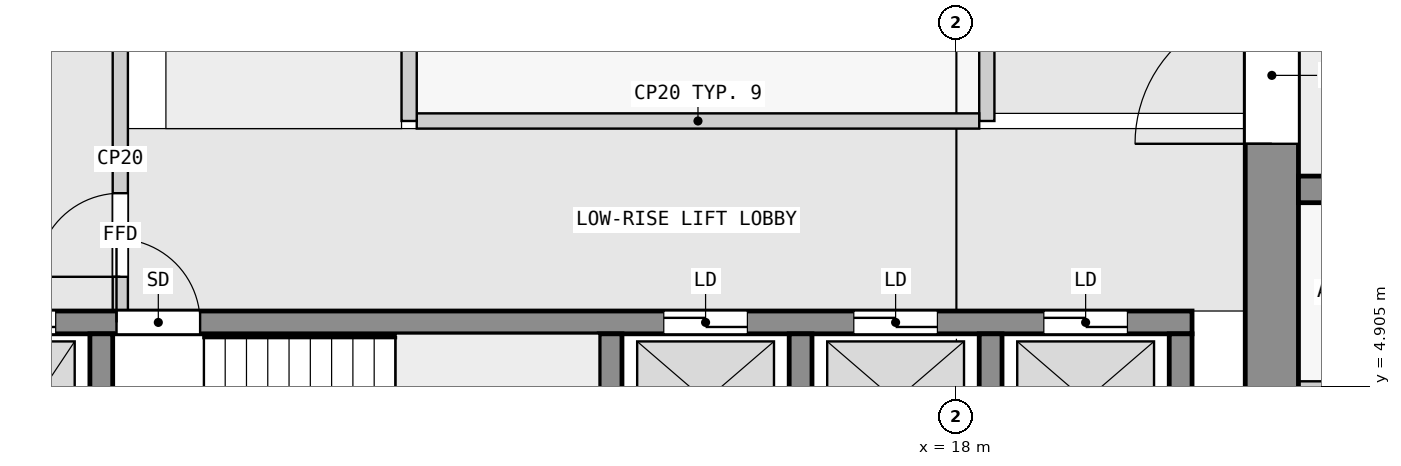
"""IFC4 building model, lengths in metres.
Left out: names, types, materials, properties, quantities, classifications, styles, units other than length and angle.
Written with IfcOpenShell. Run it as: python <this file> out.ifc"""

import sys

from ifc_helpers import new_model, si_unit, direction, frame, frame_2d, origin, place, context, subcontext, project, spatial, rectangle, extrude, element, fill, save


model = new_model("IFC4")
c1 = context("Model", 3, precision=1e-05, world=origin(), true_north=direction((0.0, 1.0)))
c2 = subcontext(c1, "Body", "Model", "MODEL_VIEW")
j1 = project(units=[si_unit("LENGTHUNIT", "METRE"), si_unit("PLANEANGLEUNIT", "RADIAN")], contexts=[c1])
p1 = place(None, origin())
s1 = spatial("IfcSite", under=j1, at=p1, CompositionType="ELEMENT")
p2 = place(p1, origin())
s2 = spatial("IfcBuilding", under=s1, at=p2, CompositionType="ELEMENT")
p3 = place(p2, frame((0.0, 0.0, 68.8)))
s3 = spatial("IfcBuildingStorey", under=s2, at=p3, CompositionType="ELEMENT", Elevation=68.8)
p4 = place(p3, frame((22.15, 2.5, 0.0), z_axis=(0.0, 0.0, 1.0), x_axis=(0.0, 1.0, 0.0)))
e1 = element("IfcWall", 1, at=p4, inside=s3, PredefinedType="SHEAR", context=c2, shape_type="SweptSolid", body=[
    extrude(rectangle(XDim=14.8, YDim=0.7, at=frame_2d((7.4, 0.0))), origin(), (0.0, 0.0, 1.0), 3.2),
])
p5 = place(p4, frame((5.6, 0.0, 0.0)))
e2 = element("IfcOpeningElement", 2, at=p5, cuts=e1, PredefinedType="OPENING", context=c2, shape_type="SweptSolid", body=[
    extrude(rectangle(XDim=1.8, YDim=2.1, at=frame_2d((0.9, 1.05))), frame((0.0, 0.36, 0.0), z_axis=(0.0, -1.0, 0.0), x_axis=(1.0, 0.0, 0.0)), (0.0, 0.0, 1.0), 0.72),
])
for number, where, z_axis, x_axis in (
    (3, (6.75, 2.8, 0.0), (0.0, 0.0, 1.0), (0.0, 1.0, 0.0)),
    (4, (13.45, 2.8, 0.0), (0.0, 0.0, 1.0), (0.0, 1.0, 0.0)),
    (5, (15.95, 2.8, 0.0), (0.0, 0.0, 1.0), (0.0, 1.0, 0.0)),
    (6, (18.45, 2.8, 0.0), (0.0, 0.0, 1.0), (0.0, 1.0, 0.0)),
    (7, (20.95, 2.8, 0.0), (0.0, 0.0, 1.0), (0.0, 1.0, 0.0)),
):
    element("IfcWall", number, at=place(p3, frame(where, z_axis=z_axis, x_axis=x_axis)), inside=s3, PredefinedType="SHEAR", context=c2, shape_type="SweptSolid", body=[
        extrude(rectangle(XDim=2.8, YDim=0.3, at=frame_2d((1.4, 0.0))), origin(), (0.0, 0.0, 1.0), 3.2),
    ])
p6 = place(p3, frame((2.3, 5.75, 0.0), z_axis=(0.0, 0.0, 1.0), x_axis=(1.0, 0.0, 0.0)))
e8 = element("IfcWall", 8, at=p6, inside=s3, PredefinedType="SHEAR", context=c2, shape_type="SweptSolid", body=[
    extrude(rectangle(XDim=18.8, YDim=0.3, at=frame_2d((9.4, 0.0))), origin(), (0.0, 0.0, 1.0), 3.2),
])
p7 = place(p6, frame((4.65, 0.0, 0.0)))
e9 = element("IfcOpeningElement", 9, at=p7, cuts=e8, PredefinedType="OPENING", context=c2, shape_type="SweptSolid", body=[
    extrude(rectangle(XDim=1.1, YDim=2.1, at=frame_2d((0.55, 1.05))), frame((0.0, 0.16, 0.0), z_axis=(0.0, -1.0, 0.0), x_axis=(1.0, 0.0, 0.0)), (0.0, 0.0, 1.0), 0.32),
])
p8 = place(p6, frame((0.45, 0.0, 0.0)))
e10 = element("IfcOpeningElement", 10, at=p8, cuts=e8, PredefinedType="OPENING", context=c2, shape_type="SweptSolid", body=[
    extrude(rectangle(XDim=1.1, YDim=2.1, at=frame_2d((0.55, 1.05))), frame((0.0, 0.16, 0.0), z_axis=(0.0, -1.0, 0.0), x_axis=(1.0, 0.0, 0.0)), (0.0, 0.0, 1.0), 0.32),
])
p9 = place(p6, frame((2.75, 0.0, 0.0)))
e11 = element("IfcOpeningElement", 11, at=p9, cuts=e8, PredefinedType="OPENING", context=c2, shape_type="SweptSolid", body=[
    extrude(rectangle(XDim=1.1, YDim=2.1, at=frame_2d((0.55, 1.05))), frame((0.0, 0.16, 0.0), z_axis=(0.0, -1.0, 0.0), x_axis=(1.0, 0.0, 0.0)), (0.0, 0.0, 1.0), 0.32),
])
p10 = place(p6, frame((11.85, 0.0, 0.0)))
e12 = element("IfcOpeningElement", 12, at=p10, cuts=e8, PredefinedType="OPENING", context=c2, shape_type="SweptSolid", body=[
    extrude(rectangle(XDim=1.1, YDim=2.1, at=frame_2d((0.55, 1.05))), frame((0.0, 0.16, 0.0), z_axis=(0.0, -1.0, 0.0), x_axis=(1.0, 0.0, 0.0)), (0.0, 0.0, 1.0), 0.32),
])
p11 = place(p6, frame((14.35, 0.0, 0.0)))
e13 = element("IfcOpeningElement", 13, at=p11, cuts=e8, PredefinedType="OPENING", context=c2, shape_type="SweptSolid", body=[
    extrude(rectangle(XDim=1.1, YDim=2.1, at=frame_2d((0.55, 1.05))), frame((0.0, 0.16, 0.0), z_axis=(0.0, -1.0, 0.0), x_axis=(1.0, 0.0, 0.0)), (0.0, 0.0, 1.0), 0.32),
])
p12 = place(p6, frame((16.85, 0.0, 0.0)))
e14 = element("IfcOpeningElement", 14, at=p12, cuts=e8, PredefinedType="OPENING", context=c2, shape_type="SweptSolid", body=[
    extrude(rectangle(XDim=1.1, YDim=2.1, at=frame_2d((0.55, 1.05))), frame((0.0, 0.16, 0.0), z_axis=(0.0, -1.0, 0.0), x_axis=(1.0, 0.0, 0.0)), (0.0, 0.0, 1.0), 0.32),
])
p13 = place(p3, frame((22.5, 7.5, 0.0), z_axis=(0.0, 0.0, 1.0), x_axis=(1.0, 0.0, 0.0)))
e15 = element("IfcWall", 15, at=p13, inside=s3, PredefinedType="SHEAR", context=c2, shape_type="SweptSolid", body=[
    extrude(rectangle(XDim=22.5, YDim=0.35, at=frame_2d((11.25, 0.0))), origin(), (0.0, 0.0, 1.0), 3.2),
])
p14 = place(p13, frame((9.55, 0.0, 0.0)))
e16 = element("IfcOpeningElement", 16, at=p14, cuts=e15, PredefinedType="OPENING", context=c2, shape_type="SweptSolid", body=[
    extrude(rectangle(XDim=1.0, YDim=2.1, at=frame_2d((0.5, 1.05))), frame((0.0, 0.185, 0.0), z_axis=(0.0, -1.0, 0.0), x_axis=(1.0, 0.0, 0.0)), (0.0, 0.0, 1.0), 0.37),
])
p15 = place(p13, frame((18.75, 0.0, 0.0)))
e17 = element("IfcOpeningElement", 17, at=p15, cuts=e15, PredefinedType="OPENING", context=c2, shape_type="SweptSolid", body=[
    extrude(rectangle(XDim=0.9, YDim=2.1, at=frame_2d((0.45, 1.05))), frame((0.0, 0.185, 0.0), z_axis=(0.0, -1.0, 0.0), x_axis=(1.0, 0.0, 0.0)), (0.0, 0.0, 1.0), 0.37),
])
p16 = place(p13, frame((20.95, 0.0, 0.0)))
e18 = element("IfcOpeningElement", 18, at=p16, cuts=e15, PredefinedType="OPENING", context=c2, shape_type="SweptSolid", body=[
    extrude(rectangle(XDim=1.0, YDim=2.1, at=frame_2d((0.5, 1.05))), frame((0.0, 0.185, 0.0), z_axis=(0.0, -1.0, 0.0), x_axis=(1.0, 0.0, 0.0)), (0.0, 0.0, 1.0), 0.37),
])
p17 = place(p3, frame((7.0, 5.9, 0.0), z_axis=(0.0, 0.0, 1.0), x_axis=(0.0, 1.0, 0.0)))
e19 = element("IfcWall", 19, at=p17, inside=s3, PredefinedType="PARTITIONING", context=c2, shape_type="SweptSolid", body=[
    extrude(rectangle(XDim=4.0, YDim=0.2, at=frame_2d((2.0, 0.0))), origin(), (0.0, 0.0, 1.0), 3.2),
])
p18 = place(p17, frame((0.45, 0.0, 0.0)))
e20 = element("IfcOpeningElement", 20, at=p18, cuts=e19, PredefinedType="OPENING", context=c2, shape_type="SweptSolid", body=[
    extrude(rectangle(XDim=1.1, YDim=2.1, at=frame_2d((0.55, 1.05))), frame((0.0, 0.11, 0.0), z_axis=(0.0, -1.0, 0.0), x_axis=(1.0, 0.0, 0.0)), (0.0, 0.0, 1.0), 0.22),
])
p19 = place(p3, frame((10.8, 8.4, 0.0), z_axis=(0.0, 0.0, 1.0), x_axis=(0.0, 1.0, 0.0)))
e21 = element("IfcWall", 21, at=p19, inside=s3, PredefinedType="PARTITIONING", context=c2, shape_type="SweptSolid", body=[
    extrude(rectangle(XDim=6.2, YDim=0.2, at=frame_2d((3.1, 0.0))), origin(), (0.0, 0.0, 1.0), 3.2),
])
p20 = place(p3, frame((10.9, 8.4, 0.0), z_axis=(0.0, 0.0, 1.0), x_axis=(1.0, 0.0, 0.0)))
e22 = element("IfcWall", 22, at=p20, inside=s3, PredefinedType="PARTITIONING", context=c2, shape_type="SweptSolid", body=[
    extrude(rectangle(XDim=7.4, YDim=0.2, at=frame_2d((3.7, 0.0))), origin(), (0.0, 0.0, 1.0), 3.2),
])
p21 = place(p3, frame((18.4, 8.4, 0.0), z_axis=(0.0, 0.0, 1.0), x_axis=(0.0, 1.0, 0.0)))
e23 = element("IfcWall", 23, at=p21, inside=s3, PredefinedType="PARTITIONING", context=c2, shape_type="SweptSolid", body=[
    extrude(rectangle(XDim=6.2, YDim=0.2, at=frame_2d((3.1, 0.0))), origin(), (0.0, 0.0, 1.0), 3.2),
])
p22 = place(p21, frame((3.15, 0.0, 0.0)))
e24 = element("IfcOpeningElement", 24, at=p22, cuts=e23, PredefinedType="OPENING", context=c2, shape_type="SweptSolid", body=[
    extrude(rectangle(XDim=0.9, YDim=2.1, at=frame_2d((0.45, 1.05))), frame((0.0, 0.11, 0.0), z_axis=(0.0, -1.0, 0.0), x_axis=(1.0, 0.0, 0.0)), (0.0, 0.0, 1.0), 0.22),
])
p23 = place(p3, frame((22.5, 4.925, 0.0), z_axis=(0.0, 0.0, 1.0), x_axis=(1.0, 0.0, 0.0)))
e25 = element("IfcWall", 25, at=p23, inside=s3, PredefinedType="PARTITIONING", context=c2, shape_type="SweptSolid", body=[
    extrude(rectangle(XDim=3.9, YDim=0.1, at=frame_2d((1.95, 0.0))), origin(), (0.0, 0.0, 1.0), 3.2),
])
p24 = place(p18, origin())
e26 = element("IfcDoor", 26, at=p24, inside=s3, OperationType="SINGLE_SWING_LEFT", PredefinedType="DOOR", context=c2, shape_type="SweptSolid", body=[
    extrude(rectangle(XDim=1.1, YDim=2.1, at=frame_2d((0.55, 1.05))), frame((0.0, 0.025, 0.0), z_axis=(0.0, -1.0, 0.0), x_axis=(1.0, 0.0, 0.0)), (0.0, 0.0, 1.0), 0.05),
])
fill(e20, e26)
p25 = place(p7, origin())
e27 = element("IfcDoor", 27, at=p25, inside=s3, OperationType="SINGLE_SWING_LEFT", PredefinedType="DOOR", context=c2, shape_type="SweptSolid", body=[
    extrude(rectangle(XDim=1.1, YDim=2.1, at=frame_2d((0.55, 1.05))), frame((0.0, 0.025, 0.0), z_axis=(0.0, -1.0, 0.0), x_axis=(1.0, 0.0, 0.0)), (0.0, 0.0, 1.0), 0.05),
])
fill(e9, e27)
p26 = place(p9, origin())
e28 = element("IfcDoor", 28, at=p26, inside=s3, OperationType="DOUBLE_DOOR_SLIDING", PredefinedType="DOOR", context=c2, shape_type="SweptSolid", body=[
    extrude(rectangle(XDim=1.1, YDim=2.1, at=frame_2d((0.55, 1.05))), frame((0.0, 0.025, 0.0), z_axis=(0.0, -1.0, 0.0), x_axis=(1.0, 0.0, 0.0)), (0.0, 0.0, 1.0), 0.05),
])
fill(e11, e28)
p27 = place(p10, origin())
e29 = element("IfcDoor", 29, at=p27, inside=s3, OperationType="DOUBLE_DOOR_SLIDING", PredefinedType="DOOR", context=c2, shape_type="SweptSolid", body=[
    extrude(rectangle(XDim=1.1, YDim=2.1, at=frame_2d((0.55, 1.05))), frame((0.0, 0.025, 0.0), z_axis=(0.0, -1.0, 0.0), x_axis=(1.0, 0.0, 0.0)), (0.0, 0.0, 1.0), 0.05),
])
fill(e12, e29)
p28 = place(p11, origin())
e30 = element("IfcDoor", 30, at=p28, inside=s3, OperationType="DOUBLE_DOOR_SLIDING", PredefinedType="DOOR", context=c2, shape_type="SweptSolid", body=[
    extrude(rectangle(XDim=1.1, YDim=2.1, at=frame_2d((0.55, 1.05))), frame((0.0, 0.025, 0.0), z_axis=(0.0, -1.0, 0.0), x_axis=(1.0, 0.0, 0.0)), (0.0, 0.0, 1.0), 0.05),
])
fill(e13, e30)
p29 = place(p12, origin())
e31 = element("IfcDoor", 31, at=p29, inside=s3, OperationType="DOUBLE_DOOR_SLIDING", PredefinedType="DOOR", context=c2, shape_type="SweptSolid", body=[
    extrude(rectangle(XDim=1.1, YDim=2.1, at=frame_2d((0.55, 1.05))), frame((0.0, 0.025, 0.0), z_axis=(0.0, -1.0, 0.0), x_axis=(1.0, 0.0, 0.0)), (0.0, 0.0, 1.0), 0.05),
])
fill(e14, e31)
p30 = place(p5, origin())
e32 = element("IfcDoor", 32, at=p30, inside=s3, OperationType="DOUBLE_DOOR_SINGLE_SWING", PredefinedType="DOOR", context=c2, shape_type="SweptSolid", body=[
    extrude(rectangle(XDim=1.8, YDim=2.1, at=frame_2d((0.9, 1.05))), frame((0.0, 0.025, 0.0), z_axis=(0.0, -1.0, 0.0), x_axis=(1.0, 0.0, 0.0)), (0.0, 0.0, 1.0), 0.05),
])
fill(e2, e32)
save(model, sys.argv[1])
